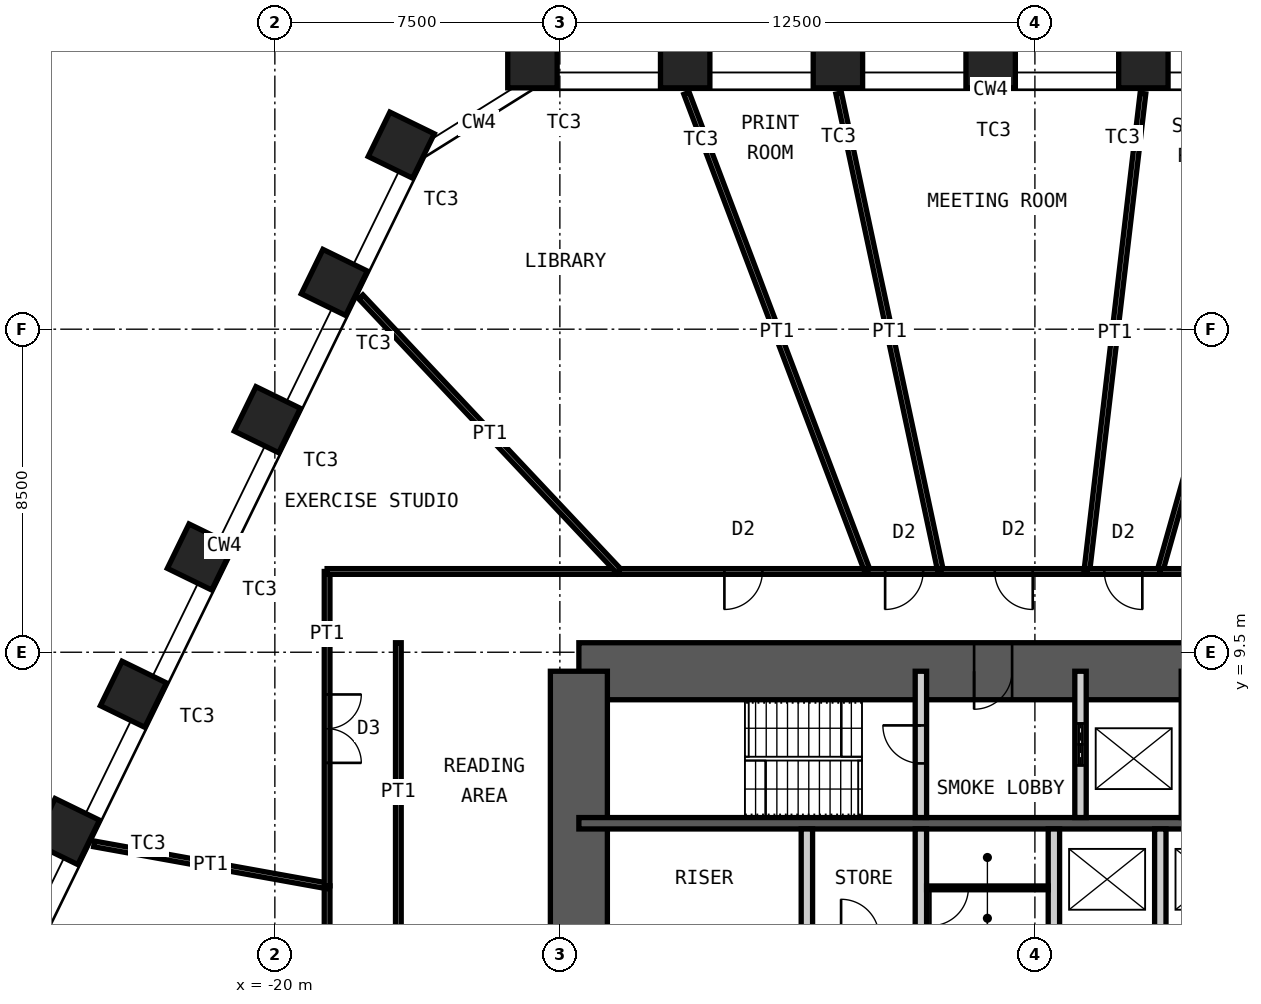
"""IFC4 building model, lengths in metres.
Left out: names, types, materials, properties, quantities, classifications, styles, units other than length and angle.
Written with IfcOpenShell. Run it as: python <this file> out.ifc"""

import sys

from ifc_helpers import new_model, si_unit, direction, frame, frame_2d, origin, origin_2d, place, context, subcontext, project, spatial, rectangle, hollow_rectangle, extrude, element, fill, save


model = new_model("IFC4")
c1 = context("Model", 3, precision=1e-05, world=origin(), true_north=direction((0.0, 1.0)))
c2 = subcontext(c1, "Body", "Model", "MODEL_VIEW")
j1 = project(units=[si_unit("LENGTHUNIT", "METRE"), si_unit("PLANEANGLEUNIT", "RADIAN")], contexts=[c1])
p1 = place(None, origin())
s1 = spatial("IfcSite", under=j1, at=p1, CompositionType="ELEMENT")
p2 = place(p1, origin())
s2 = spatial("IfcBuilding", under=s1, at=p2, CompositionType="ELEMENT")
p3 = place(p2, frame((0.0, 0.0, 132.4)))
s3 = spatial("IfcBuildingStorey", under=s2, at=p3, CompositionType="ELEMENT", Elevation=132.4)
for number, where, z_axis, x_axis in (
    (1, (-13.222, 25.0, 0.0), (0.0, 0.0, 1.0), (-1.0, 0.0, 0.0)),
    (2, (-9.203, 25.0, 0.0), (0.0, 0.0, 1.0), (-1.0, 0.0, 0.0)),
    (3, (-5.184, 25.0, 0.0), (0.0, 0.0, 1.0), (-1.0, 0.0, 0.0)),
    (4, (-1.165, 25.0, 0.0), (0.0, 0.0, 1.0), (-1.0, 0.0, 0.0)),
    (5, (2.854, 25.0, 0.0), (0.0, 0.0, 1.0), (-1.0, 0.0, 0.0)),
    (6, (-25.483, 4.781, 0.0), (0.0, 0.0, 1.0), (-0.438, -0.899, 0.0)),
    (7, (-23.721, 8.394, 0.0), (0.0, 0.0, 1.0), (-0.438, -0.899, 0.0)),
    (8, (-21.959, 12.006, 0.0), (0.0, 0.0, 1.0), (-0.438, -0.899, 0.0)),
    (9, (-20.198, 15.618, 0.0), (0.0, 0.0, 1.0), (-0.438, -0.899, 0.0)),
    (10, (-18.436, 19.23, 0.0), (0.0, 0.0, 1.0), (-0.438, -0.899, 0.0)),
    (11, (-16.674, 22.843, 0.0), (0.0, 0.0, 1.0), (-0.438, -0.899, 0.0)),
):
    element("IfcColumn", number, at=place(p3, frame(where, z_axis=z_axis, x_axis=x_axis)), inside=s3, PredefinedType="COLUMN", context=c2, shape_type="SweptSolid", body=[
        extrude(hollow_rectangle(XDim=1.3, YDim=1.3, WallThickness=0.1, at=origin_2d()), origin(), (0.0, 0.0, 1.0), 4.2),
    ])
p4 = place(p3, frame((-12.0, 9.0, 0.0), z_axis=(0.0, 0.0, 1.0), x_axis=(1.0, 0.0, 0.0)))
e12 = element("IfcWall", 12, at=p4, inside=s3, PredefinedType="SHEAR", context=c2, shape_type="SweptSolid", body=[
    extrude(rectangle(XDim=24.0, YDim=1.5, at=frame_2d((12.0, 0.0))), origin(), (0.0, 0.0, 1.0), 4.2),
])
p5 = place(p4, frame((10.4, 0.0, 0.0)))
e13 = element("IfcOpeningElement", 13, at=p5, cuts=e12, PredefinedType="OPENING", context=c2, shape_type="SweptSolid", body=[
    extrude(rectangle(XDim=1.0, YDim=2.1, at=frame_2d((0.5, 1.05))), frame((0.0, 0.76, 0.0), z_axis=(0.0, -1.0, 0.0), x_axis=(1.0, 0.0, 0.0)), (0.0, 0.0, 1.0), 1.52),
])
p6 = place(p4, frame((17.6, 0.0, 0.0)))
e14 = element("IfcOpeningElement", 14, at=p6, cuts=e12, PredefinedType="OPENING", context=c2, shape_type="SweptSolid", body=[
    extrude(rectangle(XDim=0.9, YDim=2.1, at=frame_2d((0.45, 1.05))), frame((0.0, 0.76, 0.0), z_axis=(0.0, -1.0, 0.0), x_axis=(1.0, 0.0, 0.0)), (0.0, 0.0, 1.0), 1.52),
])
p7 = place(p4, frame((21.9, 0.0, 0.0)))
e15 = element("IfcOpeningElement", 15, at=p7, cuts=e12, PredefinedType="OPENING", context=c2, shape_type="SweptSolid", body=[
    extrude(rectangle(XDim=0.9, YDim=2.1, at=frame_2d((0.45, 1.05))), frame((0.0, 0.76, 0.0), z_axis=(0.0, -1.0, 0.0), x_axis=(1.0, 0.0, 0.0)), (0.0, 0.0, 1.0), 1.52),
])
p8 = place(p3, frame((-12.0, -9.0, 0.0), z_axis=(0.0, 0.0, 1.0), x_axis=(0.0, 1.0, 0.0)))
e16 = element("IfcWall", 16, at=p8, inside=s3, PredefinedType="SHEAR", context=c2, shape_type="SweptSolid", body=[
    extrude(rectangle(XDim=18.0, YDim=1.5, at=frame_2d((9.0, 0.0))), origin(), (0.0, 0.0, 1.0), 4.2),
])
p9 = place(p8, frame((8.1, 0.0, 0.0)))
e17 = element("IfcOpeningElement", 17, at=p9, cuts=e16, PredefinedType="OPENING", context=c2, shape_type="SweptSolid", body=[
    extrude(rectangle(XDim=1.8, YDim=2.1, at=frame_2d((0.9, 1.05))), frame((0.0, 0.76, 0.0), z_axis=(0.0, -1.0, 0.0), x_axis=(1.0, 0.0, 0.0)), (0.0, 0.0, 1.0), 1.52),
])
p10 = place(p3, frame((-12.0, 5.0, 0.0), z_axis=(0.0, 0.0, 1.0), x_axis=(1.0, 0.0, 0.0)))
e18 = element("IfcWall", 18, at=p10, inside=s3, PredefinedType="SHEAR", context=c2, shape_type="SweptSolid", body=[
    extrude(rectangle(XDim=24.0, YDim=0.3, at=frame_2d((12.0, 0.0))), origin(), (0.0, 0.0, 1.0), 4.2),
])
p11 = place(p3, frame((-3.0, 5.15, 0.0), z_axis=(0.0, 0.0, 1.0), x_axis=(0.0, 1.0, 0.0)))
e19 = element("IfcWall", 19, at=p11, inside=s3, PredefinedType="PARTITIONING", context=c2, shape_type="SweptSolid", body=[
    extrude(rectangle(XDim=3.85, YDim=0.3, at=frame_2d((1.925, 0.0))), origin(), (0.0, 0.0, 1.0), 3.98),
])
p12 = place(p11, frame((1.425, 0.0, 0.0)))
e20 = element("IfcOpeningElement", 20, at=p12, cuts=e19, PredefinedType="OPENING", context=c2, shape_type="SweptSolid", body=[
    extrude(rectangle(XDim=1.0, YDim=2.1, at=frame_2d((0.5, 1.05))), frame((0.0, 0.16, 0.0), z_axis=(0.0, -1.0, 0.0), x_axis=(1.0, 0.0, 0.0)), (0.0, 0.0, 1.0), 0.32),
])
p13 = place(p3, frame((1.2, 5.15, 0.0), z_axis=(0.0, 0.0, 1.0), x_axis=(0.0, 1.0, 0.0)))
e21 = element("IfcWall", 21, at=p13, inside=s3, PredefinedType="PARTITIONING", context=c2, shape_type="SweptSolid", body=[
    extrude(rectangle(XDim=3.85, YDim=0.3, at=frame_2d((1.925, 0.0))), origin(), (0.0, 0.0, 1.0), 3.98),
])
p14 = place(p13, frame((1.375, 0.0, 0.0)))
e22 = element("IfcOpeningElement", 22, at=p14, cuts=e21, PredefinedType="OPENING", context=c2, shape_type="SweptSolid", body=[
    extrude(rectangle(XDim=1.1, YDim=2.4, at=frame_2d((0.55, 1.2))), frame((0.0, 0.16, 0.0), z_axis=(0.0, -1.0, 0.0), x_axis=(1.0, 0.0, 0.0)), (0.0, 0.0, 1.0), 0.32),
])
p15 = place(p3, frame((4.0, 5.15, 0.0), z_axis=(0.0, 0.0, 1.0), x_axis=(0.0, 1.0, 0.0)))
e23 = element("IfcWall", 23, at=p15, inside=s3, PredefinedType="PARTITIONING", context=c2, shape_type="SweptSolid", body=[
    extrude(rectangle(XDim=3.85, YDim=0.3, at=frame_2d((1.925, 0.0))), origin(), (0.0, 0.0, 1.0), 3.98),
])
for number, where, z_axis, x_axis in (
    (24, (-6.0, 2.2, 0.0), (0.0, 0.0, 1.0), (0.0, 1.0, 0.0)),
    (25, (-3.0, 2.2, 0.0), (0.0, 0.0, 1.0), (0.0, 1.0, 0.0)),
    (26, (0.5, 2.2, 0.0), (0.0, 0.0, 1.0), (0.0, 1.0, 0.0)),
    (27, (3.3, 2.2, 0.0), (0.0, 0.0, 1.0), (0.0, 1.0, 0.0)),
):
    element("IfcWall", number, at=place(p3, frame(where, z_axis=z_axis, x_axis=x_axis)), inside=s3, PredefinedType="PARTITIONING", context=c2, shape_type="SweptSolid", body=[
        extrude(rectangle(XDim=2.65, YDim=0.3, at=frame_2d((1.325, 0.0))), origin(), (0.0, 0.0, 1.0), 3.98),
    ])
p16 = place(p3, frame((-2.85, 3.3, 0.0), z_axis=(0.0, 0.0, 1.0), x_axis=(1.0, 0.0, 0.0)))
e28 = element("IfcWall", 28, at=p16, inside=s3, PredefinedType="PARTITIONING", context=c2, shape_type="SweptSolid", body=[
    extrude(rectangle(XDim=3.2, YDim=0.1, at=frame_2d((1.6, 0.0))), origin(), (0.0, 0.0, 1.0), 3.98),
])
p17 = place(p16, frame((0.1, 0.0, 0.0)))
e29 = element("IfcOpeningElement", 29, at=p17, cuts=e28, PredefinedType="OPENING", context=c2, shape_type="SweptSolid", body=[
    extrude(rectangle(XDim=1.0, YDim=2.4, at=frame_2d((0.5, 1.2))), frame((0.0, 0.06, 0.0), z_axis=(0.0, -1.0, 0.0), x_axis=(1.0, 0.0, 0.0)), (0.0, 0.0, 1.0), 0.12),
])
p18 = place(p3, frame((6.846, 24.204, 0.0), z_axis=(0.0, 0.0, 1.0), x_axis=(-0.272184461049, -0.962245093084, 0.0)))
e30 = element("IfcWall", 30, at=p18, inside=s3, PredefinedType="PARTITIONING", context=c2, shape_type="SweptSolid", body=[
    extrude(rectangle(XDim=13.073, YDim=0.15, at=frame_2d((6.536, 0.0))), origin(), (0.0, 0.0, 1.0), 3.33),
])
p19 = place(p3, frame((3.288, 11.625, 0.0), z_axis=(0.0, 0.0, 1.0), x_axis=(1.0, 0.0, 0.0)))
e31 = element("IfcWall", 31, at=p19, inside=s3, PredefinedType="PARTITIONING", context=c2, shape_type="SweptSolid", body=[
    extrude(rectangle(XDim=14.737, YDim=0.15, at=frame_2d((7.368, 0.0))), origin(), (0.0, 0.0, 1.0), 4.03),
])
p20 = place(p19, frame((6.468, 0.0, 0.0)))
e32 = element("IfcOpeningElement", 32, at=p20, cuts=e31, PredefinedType="OPENING", context=c2, shape_type="SweptSolid", body=[
    extrude(rectangle(XDim=1.8, YDim=2.4, at=frame_2d((0.9, 1.2))), frame((0.0, 0.085, 0.0), z_axis=(0.0, -1.0, 0.0), x_axis=(1.0, 0.0, 0.0)), (0.0, 0.0, 1.0), 0.17),
])
p21 = place(p3, frame((-18.625, -4.715, 0.0), z_axis=(0.0, 0.0, 1.0), x_axis=(0.0, 1.0, 0.0)))
e33 = element("IfcWall", 33, at=p21, inside=s3, PredefinedType="PARTITIONING", context=c2, shape_type="SweptSolid", body=[
    extrude(rectangle(XDim=8.068, YDim=0.15, at=frame_2d((4.034, 0.0))), origin(), (0.0, 0.0, 1.0), 4.03),
])
p22 = place(p21, frame((3.534, 0.0, 0.0)))
e34 = element("IfcOpeningElement", 34, at=p22, cuts=e33, PredefinedType="OPENING", context=c2, shape_type="SweptSolid", body=[
    extrude(rectangle(XDim=1.0, YDim=2.4, at=frame_2d((0.5, 1.2))), frame((0.0, 0.085, 0.0), z_axis=(0.0, -1.0, 0.0), x_axis=(1.0, 0.0, 0.0)), (0.0, 0.0, 1.0), 0.17),
])
p23 = place(p3, frame((-24.755, 4.457, 0.0), z_axis=(0.0, 0.0, 1.0), x_axis=(0.984175122587, -0.177198555524, 0.0)))
e35 = element("IfcWall", 35, at=p23, inside=s3, PredefinedType="PARTITIONING", context=c2, shape_type="SweptSolid", body=[
    extrude(rectangle(XDim=6.229, YDim=0.15, at=frame_2d((3.115, 0.0))), origin(), (0.0, 0.0, 1.0), 3.33),
])
p24 = place(p3, frame((-18.625, 3.353, 0.0), z_axis=(0.0, 0.0, 1.0), x_axis=(0.0, 1.0, 0.0)))
e36 = element("IfcWall", 36, at=p24, inside=s3, PredefinedType="PARTITIONING", context=c2, shape_type="SweptSolid", body=[
    extrude(rectangle(XDim=8.272, YDim=0.15, at=frame_2d((4.136, 0.0))), origin(), (0.0, 0.0, 1.0), 4.03),
])
p25 = place(p24, frame((3.236, 0.0, 0.0)))
e37 = element("IfcOpeningElement", 37, at=p25, cuts=e36, PredefinedType="OPENING", context=c2, shape_type="SweptSolid", body=[
    extrude(rectangle(XDim=1.8, YDim=2.4, at=frame_2d((0.9, 1.2))), frame((0.0, 0.085, 0.0), z_axis=(0.0, -1.0, 0.0), x_axis=(1.0, 0.0, 0.0)), (0.0, 0.0, 1.0), 0.17),
])
p26 = place(p3, frame((-18.625, 11.625, 0.0), z_axis=(0.0, 0.0, 1.0), x_axis=(1.0, 0.0, 0.0)))
e38 = element("IfcWall", 38, at=p26, inside=s3, PredefinedType="PARTITIONING", context=c2, shape_type="SweptSolid", body=[
    extrude(rectangle(XDim=7.686, YDim=0.15, at=frame_2d((3.843, 0.0))), origin(), (0.0, 0.0, 1.0), 4.03),
])
p27 = place(p3, frame((-17.738, 18.851, 0.0), z_axis=(0.0, 0.0, 1.0), x_axis=(0.685286406267, -0.728273672039, 0.0)))
e39 = element("IfcWall", 39, at=p27, inside=s3, PredefinedType="PARTITIONING", context=c2, shape_type="SweptSolid", body=[
    extrude(rectangle(XDim=9.922, YDim=0.15, at=frame_2d((4.961, 0.0))), origin(), (0.0, 0.0, 1.0), 3.33),
])
p28 = place(p3, frame((-10.939, 11.625, 0.0), z_axis=(0.0, 0.0, 1.0), x_axis=(1.0, 0.0, 0.0)))
e40 = element("IfcWall", 40, at=p28, inside=s3, PredefinedType="PARTITIONING", context=c2, shape_type="SweptSolid", body=[
    extrude(rectangle(XDim=6.536, YDim=0.15, at=frame_2d((3.268, 0.0))), origin(), (0.0, 0.0, 1.0), 4.03),
])
p29 = place(p28, frame((2.768, 0.0, 0.0)))
e41 = element("IfcOpeningElement", 41, at=p29, cuts=e40, PredefinedType="OPENING", context=c2, shape_type="SweptSolid", body=[
    extrude(rectangle(XDim=1.0, YDim=2.4, at=frame_2d((0.5, 1.2))), frame((0.0, 0.085, 0.0), z_axis=(0.0, -1.0, 0.0), x_axis=(1.0, 0.0, 0.0)), (0.0, 0.0, 1.0), 0.17),
])
p30 = place(p3, frame((-9.167, 24.207, 0.0), z_axis=(0.0, 0.0, 1.0), x_axis=(0.354156368181, -0.935186220427, 0.0)))
e42 = element("IfcWall", 42, at=p30, inside=s3, PredefinedType="PARTITIONING", context=c2, shape_type="SweptSolid", body=[
    extrude(rectangle(XDim=13.454, YDim=0.15, at=frame_2d((6.727, 0.0))), origin(), (0.0, 0.0, 1.0), 3.33),
])
p31 = place(p3, frame((-4.403, 11.625, 0.0), z_axis=(0.0, 0.0, 1.0), x_axis=(1.0, 0.0, 0.0)))
e43 = element("IfcWall", 43, at=p31, inside=s3, PredefinedType="PARTITIONING", context=c2, shape_type="SweptSolid", body=[
    extrude(rectangle(XDim=1.923, YDim=0.15, at=frame_2d((0.961, 0.0))), origin(), (0.0, 0.0, 1.0), 4.03),
])
p32 = place(p31, frame((0.461, 0.0, 0.0)))
e44 = element("IfcOpeningElement", 44, at=p32, cuts=e43, PredefinedType="OPENING", context=c2, shape_type="SweptSolid", body=[
    extrude(rectangle(XDim=1.0, YDim=2.4, at=frame_2d((0.5, 1.2))), frame((0.0, 0.085, 0.0), z_axis=(0.0, -1.0, 0.0), x_axis=(1.0, 0.0, 0.0)), (0.0, 0.0, 1.0), 0.17),
])
p33 = place(p3, frame((-5.163, 24.202, 0.0), z_axis=(0.0, 0.0, 1.0), x_axis=(0.208618861146, -0.977997019819, 0.0)))
e45 = element("IfcWall", 45, at=p33, inside=s3, PredefinedType="PARTITIONING", context=c2, shape_type="SweptSolid", body=[
    extrude(rectangle(XDim=12.86, YDim=0.15, at=frame_2d((6.43, 0.0))), origin(), (0.0, 0.0, 1.0), 3.33),
])
p34 = place(p3, frame((-2.48, 11.625, 0.0), z_axis=(0.0, 0.0, 1.0), x_axis=(1.0, 0.0, 0.0)))
e46 = element("IfcWall", 46, at=p34, inside=s3, PredefinedType="PARTITIONING", context=c2, shape_type="SweptSolid", body=[
    extrude(rectangle(XDim=3.845, YDim=0.15, at=frame_2d((1.923, 0.0))), origin(), (0.0, 0.0, 1.0), 4.03),
])
p35 = place(p34, frame((1.423, 0.0, 0.0)))
e47 = element("IfcOpeningElement", 47, at=p35, cuts=e46, PredefinedType="OPENING", context=c2, shape_type="SweptSolid", body=[
    extrude(rectangle(XDim=1.0, YDim=2.4, at=frame_2d((0.5, 1.2))), frame((0.0, 0.085, 0.0), z_axis=(0.0, -1.0, 0.0), x_axis=(1.0, 0.0, 0.0)), (0.0, 0.0, 1.0), 0.17),
])
p36 = place(p3, frame((2.843, 24.201, 0.0), z_axis=(0.0, 0.0, 1.0), x_axis=(-0.116670084723, -0.993170726175, 0.0)))
e48 = element("IfcWall", 48, at=p36, inside=s3, PredefinedType="PARTITIONING", context=c2, shape_type="SweptSolid", body=[
    extrude(rectangle(XDim=12.662, YDim=0.15, at=frame_2d((6.331, 0.0))), origin(), (0.0, 0.0, 1.0), 3.33),
])
p37 = place(p3, frame((1.366, 11.625, 0.0), z_axis=(0.0, 0.0, 1.0), x_axis=(1.0, 0.0, 0.0)))
e49 = element("IfcWall", 49, at=p37, inside=s3, PredefinedType="PARTITIONING", context=c2, shape_type="SweptSolid", body=[
    extrude(rectangle(XDim=1.923, YDim=0.15, at=frame_2d((0.961, 0.0))), origin(), (0.0, 0.0, 1.0), 4.03),
])
p38 = place(p37, frame((0.461, 0.0, 0.0)))
e50 = element("IfcOpeningElement", 50, at=p38, cuts=e49, PredefinedType="OPENING", context=c2, shape_type="SweptSolid", body=[
    extrude(rectangle(XDim=1.0, YDim=2.4, at=frame_2d((0.5, 1.2))), frame((0.0, 0.085, 0.0), z_axis=(0.0, -1.0, 0.0), x_axis=(1.0, 0.0, 0.0)), (0.0, 0.0, 1.0), 0.17),
])
p39 = place(p3, frame((-16.75, 1.9, 0.0), z_axis=(0.0, 0.0, 1.0), x_axis=(0.0, 1.0, 0.0)))
e51 = element("IfcWall", 51, at=p39, inside=s3, PredefinedType="PARTITIONING", context=c2, shape_type="SweptSolid", body=[
    extrude(rectangle(XDim=7.85, YDim=0.15, at=frame_2d((3.925, 0.0))), origin(), (0.0, 0.0, 1.0), 4.03),
])
p40 = place(p5, origin())
e52 = element("IfcDoor", 52, at=p40, inside=s3, OperationType="SINGLE_SWING_LEFT", PredefinedType="DOOR", context=c2, shape_type="SweptSolid", body=[
    extrude(rectangle(XDim=1.0, YDim=2.1, at=frame_2d((0.5, 1.05))), frame((0.0, 0.025, 0.0), z_axis=(0.0, -1.0, 0.0), x_axis=(1.0, 0.0, 0.0)), (0.0, 0.0, 1.0), 0.05),
])
fill(e13, e52)
p41 = place(p12, origin())
e53 = element("IfcDoor", 53, at=p41, inside=s3, OperationType="SINGLE_SWING_LEFT", PredefinedType="DOOR", context=c2, shape_type="SweptSolid", body=[
    extrude(rectangle(XDim=1.0, YDim=2.1, at=frame_2d((0.5, 1.05))), frame((0.0, 0.025, 0.0), z_axis=(0.0, -1.0, 0.0), x_axis=(1.0, 0.0, 0.0)), (0.0, 0.0, 1.0), 0.05),
])
fill(e20, e53)
p42 = place(p14, origin())
e54 = element("IfcDoor", 54, at=p42, inside=s3, OperationType="DOUBLE_DOOR_SLIDING", PredefinedType="DOOR", context=c2, shape_type="SweptSolid", body=[
    extrude(rectangle(XDim=1.1, YDim=2.4, at=frame_2d((0.55, 1.2))), frame((0.0, 0.025, 0.0), z_axis=(0.0, -1.0, 0.0), x_axis=(1.0, 0.0, 0.0)), (0.0, 0.0, 1.0), 0.05),
])
fill(e22, e54)
p43 = place(p17, origin())
e55 = element("IfcDoor", 55, at=p43, inside=s3, OperationType="SINGLE_SWING_LEFT", PredefinedType="DOOR", context=c2, shape_type="SweptSolid", body=[
    extrude(rectangle(XDim=1.0, YDim=2.4, at=frame_2d((0.5, 1.2))), frame((0.0, 0.025, 0.0), z_axis=(0.0, -1.0, 0.0), x_axis=(1.0, 0.0, 0.0)), (0.0, 0.0, 1.0), 0.05),
])
fill(e29, e55)
p44 = place(p25, origin())
e56 = element("IfcDoor", 56, at=p44, inside=s3, OperationType="DOUBLE_DOOR_DOUBLE_SWING", PredefinedType="DOOR", context=c2, shape_type="SweptSolid", body=[
    extrude(rectangle(XDim=1.8, YDim=2.4, at=frame_2d((0.9, 1.2))), frame((0.0, 0.025, 0.0), z_axis=(0.0, -1.0, 0.0), x_axis=(1.0, 0.0, 0.0)), (0.0, 0.0, 1.0), 0.05),
])
fill(e37, e56)
p45 = place(p29, origin())
e57 = element("IfcDoor", 57, at=p45, inside=s3, OperationType="SINGLE_SWING_LEFT", PredefinedType="DOOR", context=c2, shape_type="SweptSolid", body=[
    extrude(rectangle(XDim=1.0, YDim=2.4, at=frame_2d((0.5, 1.2))), frame((0.0, 0.025, 0.0), z_axis=(0.0, -1.0, 0.0), x_axis=(1.0, 0.0, 0.0)), (0.0, 0.0, 1.0), 0.05),
])
fill(e41, e57)
p46 = place(p32, origin())
e58 = element("IfcDoor", 58, at=p46, inside=s3, OperationType="SINGLE_SWING_LEFT", PredefinedType="DOOR", context=c2, shape_type="SweptSolid", body=[
    extrude(rectangle(XDim=1.0, YDim=2.4, at=frame_2d((0.5, 1.2))), frame((0.0, 0.025, 0.0), z_axis=(0.0, -1.0, 0.0), x_axis=(1.0, 0.0, 0.0)), (0.0, 0.0, 1.0), 0.05),
])
fill(e44, e58)
p47 = place(p35, origin())
e59 = element("IfcDoor", 59, at=p47, inside=s3, OperationType="SINGLE_SWING_RIGHT", PredefinedType="DOOR", context=c2, shape_type="SweptSolid", body=[
    extrude(rectangle(XDim=1.0, YDim=2.4, at=frame_2d((0.5, 1.2))), frame((0.0, 0.025, 0.0), z_axis=(0.0, -1.0, 0.0), x_axis=(1.0, 0.0, 0.0)), (0.0, 0.0, 1.0), 0.05),
])
fill(e47, e59)
p48 = place(p38, origin())
e60 = element("IfcDoor", 60, at=p48, inside=s3, OperationType="SINGLE_SWING_RIGHT", PredefinedType="DOOR", context=c2, shape_type="SweptSolid", body=[
    extrude(rectangle(XDim=1.0, YDim=2.4, at=frame_2d((0.5, 1.2))), frame((0.0, 0.025, 0.0), z_axis=(0.0, -1.0, 0.0), x_axis=(1.0, 0.0, 0.0)), (0.0, 0.0, 1.0), 0.05),
])
fill(e50, e60)
save(model, sys.argv[1])
